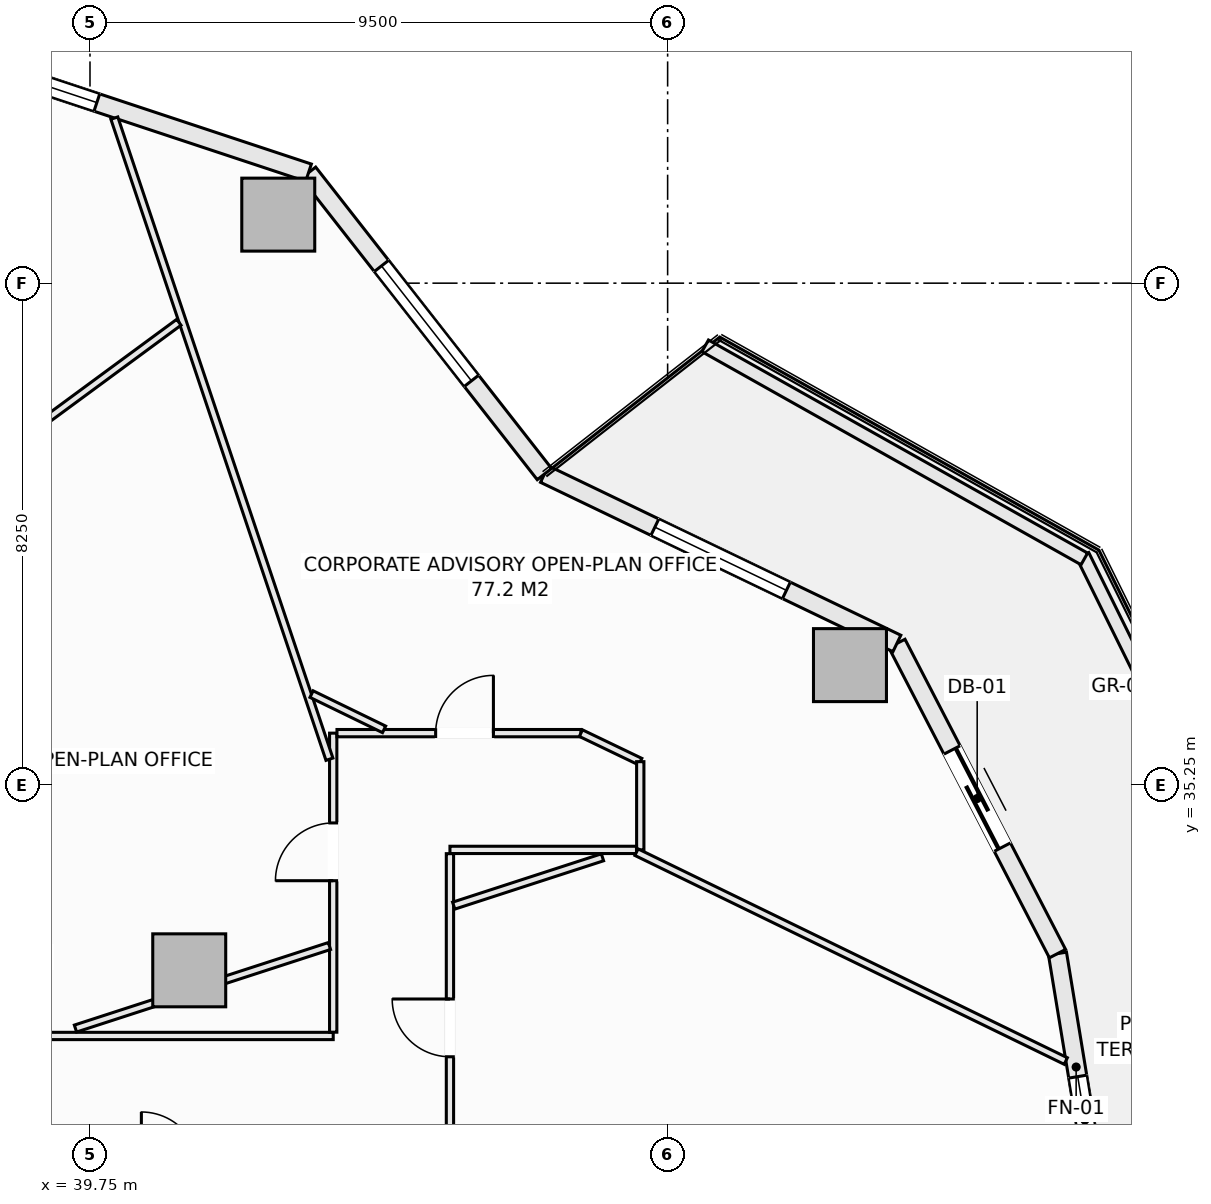
"""IFC4 building model, lengths in metres.
Left out: names, types, materials, properties, quantities, classifications, styles, units other than length and angle.
Written with IfcOpenShell. Run it as: python <this file> out.ifc"""

import sys

from ifc_helpers import new_model, si_unit, direction, frame, frame_2d, origin, origin_2d, place, context, subcontext, project, spatial, rectangle, extrude, element, fill, save


model = new_model("IFC4")
c1 = context("Model", 3, precision=1e-05, world=origin(), true_north=direction((0.0, 1.0)))
c2 = subcontext(c1, "Body", "Model", "MODEL_VIEW")
j1 = project(units=[si_unit("LENGTHUNIT", "METRE"), si_unit("PLANEANGLEUNIT", "RADIAN")], contexts=[c1])
p1 = place(None, origin())
s1 = spatial("IfcSite", under=j1, at=p1, CompositionType="ELEMENT")
p2 = place(p1, origin())
s2 = spatial("IfcBuilding", under=s1, at=p2, CompositionType="ELEMENT")
p3 = place(p2, frame((0.0, 0.0, 88.1)))
s3 = spatial("IfcBuildingStorey", under=s2, at=p3, CompositionType="ELEMENT", Elevation=88.1)
for number, where, z_axis, x_axis in (
    (1, (52.249, 37.219, -0.28), (0.0, 0.0, 1.0), (1.0, 0.0, 0.0)),
    (2, (42.846, 44.627, -0.28), (0.0, 0.0, 1.0), (1.0, 0.0, 0.0)),
    (3, (41.382, 32.199, -0.28), (0.0, 0.0, 1.0), (1.0, 0.0, 0.0)),
):
    element("IfcColumn", number, at=place(p3, frame(where, z_axis=z_axis, x_axis=x_axis)), inside=s3, PredefinedType="COLUMN", context=c2, shape_type="SweptSolid", body=[
        extrude(rectangle(XDim=1.2, YDim=1.2, at=origin_2d()), origin(), (0.0, 0.0, 1.0), 3.85),
    ])
p4 = place(p3, frame((55.662, 32.474, 0.0), z_axis=(0.0, 0.0, 1.0), x_axis=(0.162386212206, -0.986727276447, 0.0)))
e4 = element("IfcWall", 4, at=p4, inside=s3, PredefinedType="SOLIDWALL", context=c2, shape_type="SweptSolid", body=[
    extrude(rectangle(XDim=5.548, YDim=0.3, at=frame_2d((2.774, 0.0))), origin(), (0.0, 0.0, 1.0), 3.093),
])
p5 = place(p4, frame((2.05, 0.0, 0.85)))
e5 = element("IfcOpeningElement", 5, at=p5, cuts=e4, PredefinedType="OPENING", context=c2, shape_type="SweptSolid", body=[
    extrude(rectangle(XDim=2.4, YDim=1.9, at=frame_2d((1.2, 0.95))), frame((0.0, 0.16, 0.0), z_axis=(0.0, -1.0, 0.0), x_axis=(1.0, 0.0, 0.0)), (0.0, 0.0, 1.0), 0.32),
])
p6 = place(p3, frame((53.021, 37.575, 0.0), z_axis=(0.0, 0.0, 1.0), x_axis=(0.459800981414, -0.888021991558, 0.0)))
e6 = element("IfcWall", 6, at=p6, inside=s3, PredefinedType="SOLIDWALL", context=c2, shape_type="SweptSolid", body=[
    extrude(rectangle(XDim=5.744, YDim=0.3, at=frame_2d((2.872, 0.0))), origin(), (0.0, 0.0, 1.0), 3.093),
])
p7 = place(p6, frame((1.972, 0.0, 0.0)))
e7 = element("IfcOpeningElement", 7, at=p7, cuts=e6, PredefinedType="OPENING", context=c2, shape_type="SweptSolid", body=[
    extrude(rectangle(XDim=1.8, YDim=2.25, at=frame_2d((0.9, 1.125))), frame((0.0, 0.16, 0.0), z_axis=(0.0, -1.0, 0.0), x_axis=(1.0, 0.0, 0.0)), (0.0, 0.0, 1.0), 0.32),
])
p8 = place(p3, frame((47.224, 40.36, 0.0), z_axis=(0.0, 0.0, 1.0), x_axis=(0.901354747727, -0.433081538224, 0.0)))
e8 = element("IfcWall", 8, at=p8, inside=s3, PredefinedType="SOLIDWALL", context=c2, shape_type="SweptSolid", body=[
    extrude(rectangle(XDim=6.431, YDim=0.3, at=frame_2d((3.215, 0.0))), origin(), (0.0, 0.0, 1.0), 3.093),
])
p9 = place(p8, frame((2.015, 0.0, 0.85)))
e9 = element("IfcOpeningElement", 9, at=p9, cuts=e8, PredefinedType="OPENING", context=c2, shape_type="SweptSolid", body=[
    extrude(rectangle(XDim=2.4, YDim=1.9, at=frame_2d((1.2, 0.95))), frame((0.0, 0.16, 0.0), z_axis=(0.0, -1.0, 0.0), x_axis=(1.0, 0.0, 0.0)), (0.0, 0.0, 1.0), 0.32),
])
p10 = place(p3, frame((43.344, 45.316, 0.0), z_axis=(0.0, 0.0, 1.0), x_axis=(0.616434798832, -0.78740595552, 0.0)))
e10 = element("IfcWall", 10, at=p10, inside=s3, PredefinedType="SOLIDWALL", context=c2, shape_type="SweptSolid", body=[
    extrude(rectangle(XDim=6.294, YDim=0.3, at=frame_2d((3.147, 0.0))), origin(), (0.0, 0.0, 1.0), 3.093),
])
p11 = place(p10, frame((1.947, 0.0, 0.85)))
e11 = element("IfcOpeningElement", 11, at=p11, cuts=e10, PredefinedType="OPENING", context=c2, shape_type="SweptSolid", body=[
    extrude(rectangle(XDim=2.4, YDim=1.9, at=frame_2d((1.2, 0.95))), frame((0.0, 0.16, 0.0), z_axis=(0.0, -1.0, 0.0), x_axis=(1.0, 0.0, 0.0)), (0.0, 0.0, 1.0), 0.32),
])
p12 = place(p3, frame((36.968, 47.429, 0.0), z_axis=(0.0, 0.0, 1.0), x_axis=(0.949245153629, -0.314537181127, 0.0)))
e12 = element("IfcWall", 12, at=p12, inside=s3, PredefinedType="SOLIDWALL", context=c2, shape_type="SweptSolid", body=[
    extrude(rectangle(XDim=6.717, YDim=0.3, at=frame_2d((3.358, 0.0))), origin(), (0.0, 0.0, 1.0), 3.093),
])
p13 = place(p12, frame((0.65, 0.0, 0.85)))
e13 = element("IfcOpeningElement", 13, at=p13, cuts=e12, PredefinedType="OPENING", context=c2, shape_type="SweptSolid", body=[
    extrude(rectangle(XDim=2.4, YDim=1.9, at=frame_2d((1.2, 0.95))), frame((0.0, 0.16, 0.0), z_axis=(0.0, -1.0, 0.0), x_axis=(1.0, 0.0, 0.0)), (0.0, 0.0, 1.0), 0.32),
])
p14 = place(p3, frame((56.077, 39.021, 0.0), z_axis=(0.0, 0.0, 1.0), x_axis=(0.442686636348, -0.89667638644, 0.0)))
e14 = element("IfcWall", 14, at=p14, inside=s3, PredefinedType="PARAPET", context=c2, shape_type="SweptSolid", body=[
    extrude(rectangle(XDim=6.545, YDim=0.22, at=frame_2d((3.272, 0.0))), origin(), (0.0, 0.0, 1.0), 0.52),
])
p15 = place(p3, frame((49.868, 42.469, 0.0), z_axis=(0.0, 0.0, 1.0), x_axis=(0.871775109335, -0.489906275468, 0.0)))
e15 = element("IfcWall", 15, at=p15, inside=s3, PredefinedType="PARAPET", context=c2, shape_type="SweptSolid", body=[
    extrude(rectangle(XDim=7.152, YDim=0.22, at=frame_2d((3.576, 0.0))), origin(), (0.0, 0.0, 1.0), 0.52),
])
p16 = place(p3, frame((39.02, 31.12, 0.0), z_axis=(0.0, 0.0, 1.0), x_axis=(1.0, 0.0, 0.0)))
e16 = element("IfcWall", 16, at=p16, inside=s3, PredefinedType="PARTITIONING", context=c2, shape_type="SweptSolid", body=[
    extrude(rectangle(XDim=4.73, YDim=0.12, at=frame_2d((2.365, 0.0))), origin(), (0.0, 0.0, 1.0), 3.57),
])
p17 = place(p3, frame((43.75, 31.182, 0.0), z_axis=(0.0, 0.0, 1.0), x_axis=(0.0, 1.0, 0.0)))
e17 = element("IfcWall", 17, at=p17, inside=s3, PredefinedType="PARTITIONING", context=c2, shape_type="SweptSolid", body=[
    extrude(rectangle(XDim=4.918, YDim=0.12, at=frame_2d((2.459, 0.0))), origin(), (0.0, 0.0, 1.0), 3.57),
])
p18 = place(p17, frame((2.491, 0.0, 0.0)))
e18 = element("IfcOpeningElement", 18, at=p18, cuts=e17, PredefinedType="OPENING", context=c2, shape_type="SweptSolid", body=[
    extrude(rectangle(XDim=0.95, YDim=2.1, at=frame_2d((0.475, 1.05))), frame((0.0, 0.07, 0.0), z_axis=(0.0, -1.0, 0.0), x_axis=(1.0, 0.0, 0.0)), (0.0, 0.0, 1.0), 0.14),
])
p19 = place(p3, frame((43.812, 36.1, 0.0), z_axis=(0.0, 0.0, 1.0), x_axis=(1.0, 0.0, 0.0)))
e19 = element("IfcWall", 19, at=p19, inside=s3, PredefinedType="PARTITIONING", context=c2, shape_type="SweptSolid", body=[
    extrude(rectangle(XDim=4.012, YDim=0.12, at=frame_2d((2.006, 0.0))), origin(), (0.0, 0.0, 1.0), 3.57),
])
p20 = place(p19, frame((1.623, 0.0, 0.0)))
e20 = element("IfcOpeningElement", 20, at=p20, cuts=e19, PredefinedType="OPENING", context=c2, shape_type="SweptSolid", body=[
    extrude(rectangle(XDim=0.95, YDim=2.1, at=frame_2d((0.475, 1.05))), frame((0.0, 0.07, 0.0), z_axis=(0.0, -1.0, 0.0), x_axis=(1.0, 0.0, 0.0)), (0.0, 0.0, 1.0), 0.14),
])
p21 = place(p3, frame((47.824, 36.1, 0.0), z_axis=(0.0, 0.0, 1.0), x_axis=(0.901350599951, -0.433090170712, 0.0)))
e21 = element("IfcWall", 21, at=p21, inside=s3, PredefinedType="PARTITIONING", context=c2, shape_type="SweptSolid", body=[
    extrude(rectangle(XDim=1.083, YDim=0.12, at=frame_2d((0.542, 0.0))), origin(), (0.0, 0.0, 1.0), 3.57),
])
p22 = place(p3, frame((48.8, 34.18, 0.0), z_axis=(0.0, 0.0, 1.0), x_axis=(0.0, 1.0, 0.0)))
e22 = element("IfcWall", 22, at=p22, inside=s3, PredefinedType="PARTITIONING", context=c2, shape_type="SweptSolid", body=[
    extrude(rectangle(XDim=1.451, YDim=0.12, at=frame_2d((0.726, 0.0))), origin(), (0.0, 0.0, 1.0), 3.57),
])
p23 = place(p3, frame((45.67, 34.18, 0.0), z_axis=(0.0, 0.0, 1.0), x_axis=(1.0, 0.0, 0.0)))
e23 = element("IfcWall", 23, at=p23, inside=s3, PredefinedType="PARTITIONING", context=c2, shape_type="SweptSolid", body=[
    extrude(rectangle(XDim=3.068, YDim=0.12, at=frame_2d((1.534, 0.0))), origin(), (0.0, 0.0, 1.0), 3.205),
])
p24 = place(p3, frame((45.67, 19.32, 0.0), z_axis=(0.0, 0.0, 1.0), x_axis=(0.0, 1.0, 0.0)))
e24 = element("IfcWall", 24, at=p24, inside=s3, PredefinedType="PARTITIONING", context=c2, shape_type="SweptSolid", body=[
    extrude(rectangle(XDim=14.798, YDim=0.12, at=frame_2d((7.399, 0.0))), origin(), (0.0, 0.0, 1.0), 3.57),
])
p25 = place(p24, frame((11.458, 0.0, 0.0)))
e25 = element("IfcOpeningElement", 25, at=p25, cuts=e24, PredefinedType="OPENING", context=c2, shape_type="SweptSolid", body=[
    extrude(rectangle(XDim=0.95, YDim=2.1, at=frame_2d((0.475, 1.05))), frame((0.0, 0.07, 0.0), z_axis=(0.0, -1.0, 0.0), x_axis=(1.0, 0.0, 0.0)), (0.0, 0.0, 1.0), 0.14),
])
p26 = place(p3, frame((40.15, 46.215, 0.0), z_axis=(0.0, 0.0, 1.0), x_axis=(0.318097538603, -0.948057991863, 0.0)))
e26 = element("IfcWall", 26, at=p26, inside=s3, PredefinedType="PARTITIONING", context=c2, shape_type="SweptSolid", body=[
    extrude(rectangle(XDim=11.121, YDim=0.12, at=frame_2d((5.561, 0.0))), origin(), (0.0, 0.0, 1.0), 3.57),
])
p27 = place(p3, frame((39.511, 31.242, 0.0), z_axis=(0.0, 0.0, 1.0), x_axis=(0.951052042302, 0.30903076357, 0.0)))
e27 = element("IfcWall", 27, at=p27, inside=s3, PredefinedType="PARTITIONING", context=c2, shape_type="SweptSolid", body=[
    extrude(rectangle(XDim=4.392, YDim=0.12, at=frame_2d((2.196, 0.0))), origin(), (0.0, 0.0, 1.0), 3.57),
])
p28 = place(p3, frame((45.732, 33.263, 0.0), z_axis=(0.0, 0.0, 1.0), x_axis=(0.951057081836, 0.309015253813, 0.0)))
e28 = element("IfcWall", 28, at=p28, inside=s3, PredefinedType="PARTITIONING", context=c2, shape_type="SweptSolid", body=[
    extrude(rectangle(XDim=2.573, YDim=0.12, at=frame_2d((1.286, 0.0))), origin(), (0.0, 0.0, 1.0), 3.57),
])
p29 = place(p3, frame((43.394, 36.742, 0.0), z_axis=(0.0, 0.0, 1.0), x_axis=(0.899305525601, -0.437320902339, 0.0)))
e29 = element("IfcWall", 29, at=p29, inside=s3, PredefinedType="PARTITIONING", context=c2, shape_type="SweptSolid", body=[
    extrude(rectangle(XDim=1.326, YDim=0.12, at=frame_2d((0.663, 0.0))), origin(), (0.0, 0.0, 1.0), 3.57),
])
p30 = place(p3, frame((48.738, 34.143, 0.0), z_axis=(0.0, 0.0, 1.0), x_axis=(0.899231452107, -0.437473194083, 0.0)))
e30 = element("IfcWall", 30, at=p30, inside=s3, PredefinedType="PARTITIONING", context=c2, shape_type="SweptSolid", body=[
    extrude(rectangle(XDim=7.852, YDim=0.12, at=frame_2d((3.926, 0.0))), origin(), (0.0, 0.0, 1.0), 3.57),
])
p31 = place(p3, frame((29.842, 34.495, 0.0), z_axis=(0.0, 0.0, 1.0), x_axis=(0.805582047077, 0.592484232219, 0.0)))
e31 = element("IfcWall", 31, at=p31, inside=s3, PredefinedType="PARTITIONING", context=c2, shape_type="SweptSolid", body=[
    extrude(rectangle(XDim=14.114, YDim=0.12, at=frame_2d((7.057, 0.0))), origin(), (0.0, 0.0, 1.0), 2.934),
])
p32 = place(p5, origin())
e32 = element("IfcWindow", 32, at=p32, inside=s3, PartitioningType="SINGLE_PANEL", PredefinedType="WINDOW", context=c2, shape_type="SweptSolid", body=[
    extrude(rectangle(XDim=2.4, YDim=1.9, at=frame_2d((1.2, 0.95))), frame((0.0, 0.03, 0.0), z_axis=(0.0, -1.0, 0.0), x_axis=(1.0, 0.0, 0.0)), (0.0, 0.0, 1.0), 0.06),
])
fill(e5, e32)
p33 = place(p7, origin())
e33 = element("IfcDoor", 33, at=p33, inside=s3, OperationType="SLIDING_TO_LEFT", PredefinedType="DOOR", context=c2, shape_type="SweptSolid", body=[
    extrude(rectangle(XDim=1.8, YDim=2.25, at=frame_2d((0.9, 1.125))), frame((0.0, 0.025, 0.0), z_axis=(0.0, -1.0, 0.0), x_axis=(1.0, 0.0, 0.0)), (0.0, 0.0, 1.0), 0.05),
])
fill(e7, e33)
p34 = place(p9, origin())
e34 = element("IfcWindow", 34, at=p34, inside=s3, PartitioningType="SINGLE_PANEL", PredefinedType="WINDOW", context=c2, shape_type="SweptSolid", body=[
    extrude(rectangle(XDim=2.4, YDim=1.9, at=frame_2d((1.2, 0.95))), frame((0.0, 0.03, 0.0), z_axis=(0.0, -1.0, 0.0), x_axis=(1.0, 0.0, 0.0)), (0.0, 0.0, 1.0), 0.06),
])
fill(e9, e34)
p35 = place(p11, origin())
e35 = element("IfcWindow", 35, at=p35, inside=s3, PartitioningType="SINGLE_PANEL", PredefinedType="WINDOW", context=c2, shape_type="SweptSolid", body=[
    extrude(rectangle(XDim=2.4, YDim=1.9, at=frame_2d((1.2, 0.95))), frame((0.0, 0.03, 0.0), z_axis=(0.0, -1.0, 0.0), x_axis=(1.0, 0.0, 0.0)), (0.0, 0.0, 1.0), 0.06),
])
fill(e11, e35)
p36 = place(p13, origin())
e36 = element("IfcWindow", 36, at=p36, inside=s3, PartitioningType="SINGLE_PANEL", PredefinedType="WINDOW", context=c2, shape_type="SweptSolid", body=[
    extrude(rectangle(XDim=2.4, YDim=1.9, at=frame_2d((1.2, 0.95))), frame((0.0, 0.03, 0.0), z_axis=(0.0, -1.0, 0.0), x_axis=(1.0, 0.0, 0.0)), (0.0, 0.0, 1.0), 0.06),
])
fill(e13, e36)
p37 = place(p25, origin())
e37 = element("IfcDoor", 37, at=p37, inside=s3, OperationType="SINGLE_SWING_RIGHT", PredefinedType="DOOR", context=c2, shape_type="SweptSolid", body=[
    extrude(rectangle(XDim=0.95, YDim=2.1, at=frame_2d((0.475, 1.05))), frame((0.0, 0.025, 0.0), z_axis=(0.0, -1.0, 0.0), x_axis=(1.0, 0.0, 0.0)), (0.0, 0.0, 1.0), 0.05),
])
fill(e25, e37)
p38 = place(p20, origin())
e38 = element("IfcDoor", 38, at=p38, inside=s3, OperationType="SINGLE_SWING_RIGHT", PredefinedType="DOOR", context=c2, shape_type="SweptSolid", body=[
    extrude(rectangle(XDim=0.95, YDim=2.1, at=frame_2d((0.475, 1.05))), frame((0.0, 0.025, 0.0), z_axis=(0.0, -1.0, 0.0), x_axis=(1.0, 0.0, 0.0)), (0.0, 0.0, 1.0), 0.05),
])
fill(e20, e38)
p39 = place(p18, origin())
e39 = element("IfcDoor", 39, at=p39, inside=s3, OperationType="SINGLE_SWING_LEFT", PredefinedType="DOOR", context=c2, shape_type="SweptSolid", body=[
    extrude(rectangle(XDim=0.95, YDim=2.1, at=frame_2d((0.475, 1.05))), frame((0.0, 0.025, 0.0), z_axis=(0.0, -1.0, 0.0), x_axis=(1.0, 0.0, 0.0)), (0.0, 0.0, 1.0), 0.05),
])
fill(e18, e39)
save(model, sys.argv[1])
